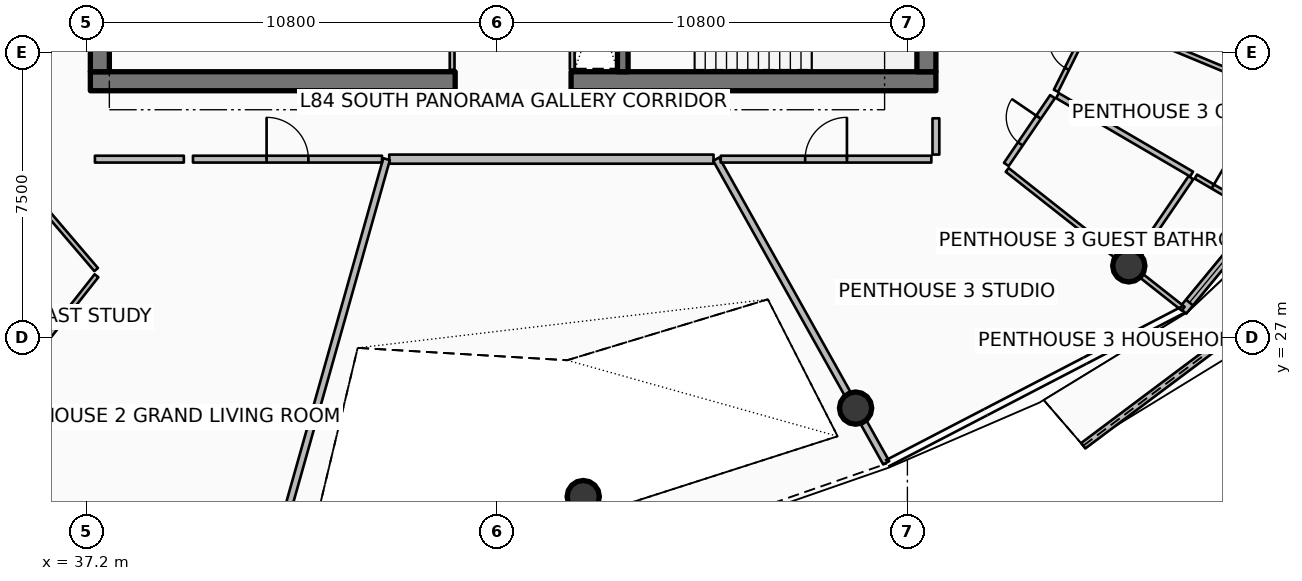
"""IFC4 building model, lengths in metres.
Left out: names, types, materials, properties, quantities, classifications, styles, units other than length and angle.
Written with IfcOpenShell. Run it as: python <this file> out.ifc"""

import sys

from ifc_helpers import new_model, si_unit, direction, frame, frame_2d, origin, origin_2d, place, context, subcontext, project, spatial, polyline, rectangle, circle, outline, extrude, element, fill, save


model = new_model("IFC4")
c1 = context("Model", 3, precision=1e-05, world=origin(), true_north=direction((0.0, 1.0)))
c2 = subcontext(c1, "Body", "Model", "MODEL_VIEW")
j1 = project(units=[si_unit("LENGTHUNIT", "METRE"), si_unit("PLANEANGLEUNIT", "RADIAN")], contexts=[c1])
p1 = place(None, origin())
s1 = spatial("IfcSite", under=j1, at=p1, CompositionType="ELEMENT")
p2 = place(p1, origin())
s2 = spatial("IfcBuilding", under=s1, at=p2, CompositionType="ELEMENT")
p3 = place(p2, frame((0.0, 0.0, 334.7)))
s3 = spatial("IfcBuildingStorey", under=s2, at=p3, CompositionType="ELEMENT", Elevation=334.7)
p4 = place(p3, frame((37.3, 33.75, 0.0), z_axis=(0.0, 0.0, 1.0), x_axis=(1.0, 0.0, 0.0)))
e1 = element("IfcWall", 1, at=p4, inside=s3, PredefinedType="SHEAR", context=c2, shape_type="SweptSolid", body=[
    extrude(rectangle(XDim=9.6, YDim=0.5, at=frame_2d((4.8, 0.0))), origin(), (0.0, 0.0, 1.0), 4.2),
])
p5 = place(p3, frame((49.95, 33.75, 0.0), z_axis=(0.0, 0.0, 1.0), x_axis=(1.0, 0.0, 0.0)))
e2 = element("IfcWall", 2, at=p5, inside=s3, PredefinedType="SHEAR", context=c2, shape_type="SweptSolid", body=[
    extrude(rectangle(XDim=9.6, YDim=0.5, at=frame_2d((4.8, 0.0))), origin(), (0.0, 0.0, 1.0), 4.2),
])
for number, where, z_axis, x_axis in (
    (3, (37.55, 34.0, 0.0), (0.0, 0.0, 1.0), (0.0, 1.0, 0.0)),
    (4, (59.3, 34.0, 0.0), (0.0, 0.0, 1.0), (0.0, 1.0, 0.0)),
):
    element("IfcWall", number, at=place(p3, frame(where, z_axis=z_axis, x_axis=x_axis)), inside=s3, PredefinedType="SHEAR", context=c2, shape_type="SweptSolid", body=[
        extrude(rectangle(XDim=16.0, YDim=0.5, at=frame_2d((8.0, 0.0))), origin(), (0.0, 0.0, 1.0), 4.2),
    ])
p6 = place(p3, frame((51.31, 34.0, 0.0), z_axis=(0.0, 0.0, 1.0), x_axis=(0.0, 1.0, 0.0)))
e5 = element("IfcWall", 5, at=p6, inside=s3, PredefinedType="SHEAR", context=c2, shape_type="SweptSolid", body=[
    extrude(rectangle(XDim=3.5, YDim=0.28, at=frame_2d((1.75, 0.0))), origin(), (0.0, 0.0, 1.0), 4.2),
])
p7 = place(p3, frame((50.27, 22.821, 0.0), z_axis=(0.0, 0.0, 1.0), x_axis=(1.0, 0.0, 0.0)))
e6 = element("IfcColumn", 6, at=p7, inside=s3, PredefinedType="COLUMN", context=c2, shape_type="SweptSolid", body=[
    extrude(circle(Radius=0.425, at=origin_2d()), origin(), (0.0, 0.0, 1.0), 4.196),
])
for number, where, z_axis, x_axis in (
    (7, (57.437, 25.149, 0.0), (0.0, 0.0, 1.0), (1.0, 0.0, 0.0)),
    (8, (64.626, 28.893, 0.0), (0.0, 0.0, 1.0), (1.0, 0.0, 0.0)),
):
    element("IfcColumn", number, at=place(p3, frame(where, z_axis=z_axis, x_axis=x_axis)), inside=s3, PredefinedType="COLUMN", context=c2, shape_type="SweptSolid", body=[
        extrude(circle(Radius=0.425, at=origin_2d()), origin(), (0.0, 0.0, 1.0), 3.94),
    ])
p8 = place(p3, frame((63.427, 24.159, 0.0), z_axis=(0.0, 0.0, 1.0), x_axis=(0.800350065213, 0.599532962491, 0.0)))
e9 = element("IfcWall", 9, at=p8, inside=s3, PredefinedType="PARAPET", context=c2, shape_type="SweptSolid", body=[
    extrude(outline(polyline([(0.0, 0.0), (9.788, 0.0), (9.788, 1.348), (4.894, 1.182), (0.0, 1.12), (0.0, 0.0)])), frame((0.0, 0.09, 0.0), z_axis=(0.0, -1.0, 0.0), x_axis=(1.0, 0.0, 0.0)), (0.0, 0.0, 1.0), 0.18),
])
p9 = place(p3, frame((66.045, 27.711, 0.0), z_axis=(0.0, 0.0, 1.0), x_axis=(0.636803612721, 0.771026042897, 0.0)))
e10 = element("IfcWall", 10, at=p9, inside=s3, PredefinedType="SOLIDWALL", context=c2, shape_type="SweptSolid", body=[
    extrude(rectangle(XDim=9.728, YDim=0.24, at=frame_2d((4.864, 0.0))), origin(), (0.0, 0.0, 1.0), 2.89),
])
p10 = place(p9, frame((7.508, 0.0, 0.0)))
e11 = element("IfcOpeningElement", 11, at=p10, cuts=e10, PredefinedType="OPENING", context=c2, shape_type="SweptSolid", body=[
    extrude(rectangle(XDim=1.45, YDim=2.15, at=frame_2d((0.725, 1.075))), frame((0.0, 0.13, 0.0), z_axis=(0.0, -1.0, 0.0), x_axis=(1.0, 0.0, 0.0)), (0.0, 0.0, 1.0), 0.26),
])
p11 = place(p9, frame((0.28, 0.0, 0.65)))
e12 = element("IfcOpeningElement", 12, at=p11, cuts=e10, PredefinedType="OPENING", context=c2, shape_type="SweptSolid", body=[
    extrude(rectangle(XDim=1.6, YDim=1.5, at=frame_2d((0.8, 0.75))), frame((0.0, 0.13, 0.0), z_axis=(0.0, -1.0, 0.0), x_axis=(1.0, 0.0, 0.0)), (0.0, 0.0, 1.0), 0.26),
])
p12 = place(p3, frame((46.82, 34.05, 0.0), z_axis=(0.0, 0.0, 1.0), x_axis=(0.0, 1.0, 0.0)))
e13 = element("IfcWall", 13, at=p12, inside=s3, PredefinedType="PARTITIONING", context=c2, shape_type="SweptSolid", body=[
    extrude(rectangle(XDim=2.03, YDim=0.125, at=frame_2d((1.015, 0.0))), origin(), (0.0, 0.0, 1.0), 3.38),
])
p13 = place(p3, frame((49.98, 34.06, 0.0), z_axis=(0.0, 0.0, 1.0), x_axis=(0.0, 1.0, 0.0)))
e14 = element("IfcWall", 14, at=p13, inside=s3, PredefinedType="PARTITIONING", context=c2, shape_type="SweptSolid", body=[
    extrude(rectangle(XDim=3.4, YDim=0.125, at=frame_2d((1.7, 0.0))), origin(), (0.0, 0.0, 1.0), 3.38),
])
p14 = place(p3, frame((45.165, 31.7, 0.0), z_axis=(0.0, 0.0, 1.0), x_axis=(1.0, 0.0, 0.0)))
e15 = element("IfcWall", 15, at=p14, inside=s3, PredefinedType="SOLIDWALL", context=c2, shape_type="SweptSolid", body=[
    extrude(rectangle(XDim=8.533, YDim=0.24, at=frame_2d((4.267, 0.0))), origin(), (0.0, 0.0, 1.0), 3.38),
])
p15 = place(p3, frame((45.095, 31.7, 0.0), z_axis=(0.0, 0.0, 1.0), x_axis=(-0.271453030279, -0.962451688321, 0.0)))
e16 = element("IfcWall", 16, at=p15, inside=s3, PredefinedType="PARTITIONING", context=c2, shape_type="SweptSolid", body=[
    extrude(rectangle(XDim=12.191, YDim=0.18, at=frame_2d((6.096, 0.0))), origin(), (0.0, 0.0, 1.0), 3.38),
])
p16 = place(p3, frame((53.768, 31.7, 0.0), z_axis=(0.0, 0.0, 1.0), x_axis=(0.488623665245, -0.872494649704, 0.0)))
e17 = element("IfcWall", 17, at=p16, inside=s3, PredefinedType="PARTITIONING", context=c2, shape_type="SweptSolid", body=[
    extrude(rectangle(XDim=9.157, YDim=0.18, at=frame_2d((4.579, 0.0))), origin(), (0.0, 0.0, 1.0), 3.38),
])
p17 = place(p3, frame((40.0, 31.7, 0.0), z_axis=(0.0, 0.0, 1.0), x_axis=(1.0, 0.0, 0.0)))
e18 = element("IfcWall", 18, at=p17, inside=s3, PredefinedType="PARTITIONING", context=c2, shape_type="SweptSolid", body=[
    extrude(rectangle(XDim=4.975, YDim=0.18, at=frame_2d((2.488, 0.0))), origin(), (0.0, 0.0, 1.0), 3.38),
])
p18 = place(p17, frame((1.938, 0.0, 0.0)))
e19 = element("IfcOpeningElement", 19, at=p18, cuts=e18, PredefinedType="OPENING", context=c2, shape_type="SweptSolid", body=[
    extrude(rectangle(XDim=1.1, YDim=2.1, at=frame_2d((0.55, 1.05))), frame((0.0, 0.1, 0.0), z_axis=(0.0, -1.0, 0.0), x_axis=(1.0, 0.0, 0.0)), (0.0, 0.0, 1.0), 0.2),
])
p19 = place(p3, frame((37.42, 31.7, 0.0), z_axis=(0.0, 0.0, 1.0), x_axis=(1.0, 0.0, 0.0)))
e20 = element("IfcWall", 20, at=p19, inside=s3, PredefinedType="PARTITIONING", context=c2, shape_type="SweptSolid", body=[
    extrude(rectangle(XDim=2.34, YDim=0.18, at=frame_2d((1.17, 0.0))), origin(), (0.0, 0.0, 1.0), 3.38),
])
p20 = place(p3, frame((37.462, 28.632, 0.0), z_axis=(0.0, 0.0, 1.0), x_axis=(-0.619099165969, -0.78531281837, 0.0)))
e21 = element("IfcWall", 21, at=p20, inside=s3, PredefinedType="PARTITIONING", context=c2, shape_type="SweptSolid", body=[
    extrude(rectangle(XDim=8.105, YDim=0.125, at=frame_2d((4.052, 0.0))), origin(), (0.0, 0.0, 1.0), 3.38),
])
p21 = place(p3, frame((33.307, 33.648, 0.0), z_axis=(0.0, 0.0, 1.0), x_axis=(0.649467421322, -0.760389419075, 0.0)))
e22 = element("IfcWall", 22, at=p21, inside=s3, PredefinedType="PARTITIONING", context=c2, shape_type="SweptSolid", body=[
    extrude(rectangle(XDim=6.383, YDim=0.125, at=frame_2d((3.191, 0.0))), origin(), (0.0, 0.0, 1.0), 3.38),
])
p22 = place(p21, frame((2.741, 0.0, 0.0)))
e23 = element("IfcOpeningElement", 23, at=p22, cuts=e22, PredefinedType="OPENING", context=c2, shape_type="SweptSolid", body=[
    extrude(rectangle(XDim=0.9, YDim=2.08, at=frame_2d((0.45, 1.04))), frame((0.0, 0.073, 0.0), z_axis=(0.0, -1.0, 0.0), x_axis=(1.0, 0.0, 0.0)), (0.0, 0.0, 1.0), 0.145),
])
p23 = place(p3, frame((53.888, 31.7, 0.0), z_axis=(0.0, 0.0, 1.0), x_axis=(1.0, 0.0, 0.0)))
e24 = element("IfcWall", 24, at=p23, inside=s3, PredefinedType="PARTITIONING", context=c2, shape_type="SweptSolid", body=[
    extrude(rectangle(XDim=5.542, YDim=0.18, at=frame_2d((2.771, 0.0))), origin(), (0.0, 0.0, 1.0), 3.38),
])
p24 = place(p23, frame((2.221, 0.0, 0.0)))
e25 = element("IfcOpeningElement", 25, at=p24, cuts=e24, PredefinedType="OPENING", context=c2, shape_type="SweptSolid", body=[
    extrude(rectangle(XDim=1.1, YDim=2.1, at=frame_2d((0.55, 1.05))), frame((0.0, 0.1, 0.0), z_axis=(0.0, -1.0, 0.0), x_axis=(1.0, 0.0, 0.0)), (0.0, 0.0, 1.0), 0.2),
])
p25 = place(p3, frame((59.55, 31.82, 0.0), z_axis=(0.0, 0.0, 1.0), x_axis=(0.0, 1.0, 0.0)))
e26 = element("IfcWall", 26, at=p25, inside=s3, PredefinedType="PARTITIONING", context=c2, shape_type="SweptSolid", body=[
    extrude(rectangle(XDim=0.955, YDim=0.18, at=frame_2d((0.477, 0.0))), origin(), (0.0, 0.0, 1.0), 3.38),
])
p26 = place(p3, frame((61.426, 31.416, 0.0), z_axis=(0.0, 0.0, 1.0), x_axis=(0.785316001521, -0.619095128196, 0.0)))
e27 = element("IfcWall", 27, at=p26, inside=s3, PredefinedType="PARTITIONING", context=c2, shape_type="SweptSolid", body=[
    extrude(rectangle(XDim=5.897, YDim=0.125, at=frame_2d((2.949, 0.0))), origin(), (0.0, 0.0, 1.0), 3.38),
])
p27 = place(p3, frame((61.404, 31.561, 0.0), z_axis=(0.0, 0.0, 1.0), x_axis=(0.563417581251, 0.826172275701, 0.0)))
e28 = element("IfcWall", 28, at=p27, inside=s3, PredefinedType="PARTITIONING", context=c2, shape_type="SweptSolid", body=[
    extrude(rectangle(XDim=2.157, YDim=0.15, at=frame_2d((1.079, 0.0))), origin(), (0.0, 0.0, 1.0), 3.38),
])
p28 = place(p27, frame((0.654, 0.0, 0.0)))
e29 = element("IfcOpeningElement", 29, at=p28, cuts=e28, PredefinedType="OPENING", context=c2, shape_type="SweptSolid", body=[
    extrude(rectangle(XDim=0.85, YDim=2.06, at=frame_2d((0.425, 1.03))), frame((0.0, 0.085, 0.0), z_axis=(0.0, -1.0, 0.0), x_axis=(1.0, 0.0, 0.0)), (0.0, 0.0, 1.0), 0.17),
])
p29 = place(p3, frame((64.718, 28.948, 0.0), z_axis=(0.0, 0.0, 1.0), x_axis=(0.563428051063, 0.826165135596, 0.0)))
e30 = element("IfcWall", 30, at=p29, inside=s3, PredefinedType="PARTITIONING", context=c2, shape_type="SweptSolid", body=[
    extrude(rectangle(XDim=2.74, YDim=0.15, at=frame_2d((1.37, 0.0))), origin(), (0.0, 0.0, 1.0), 3.38),
])
p30 = place(p3, frame((62.748, 33.372, 0.0), z_axis=(0.0, 0.0, 1.0), x_axis=(0.863113475275, -0.505010028413, 0.0)))
e31 = element("IfcWall", 31, at=p30, inside=s3, PredefinedType="PARTITIONING", context=c2, shape_type="SweptSolid", body=[
    extrude(rectangle(XDim=4.09, YDim=0.15, at=frame_2d((2.045, 0.0))), origin(), (0.0, 0.0, 1.0), 3.38),
])
p31 = place(p3, frame((66.39, 31.241, 0.0), z_axis=(0.0, 0.0, 1.0), x_axis=(0.863105475884, -0.505023699939, 0.0)))
e32 = element("IfcWall", 32, at=p31, inside=s3, PredefinedType="PARTITIONING", context=c2, shape_type="SweptSolid", body=[
    extrude(rectangle(XDim=1.883, YDim=0.125, at=frame_2d((0.941, 0.0))), origin(), (0.0, 0.0, 1.0), 3.38),
])
p32 = place(p31, frame((0.516, 0.0, 0.0)))
e33 = element("IfcOpeningElement", 33, at=p32, cuts=e32, PredefinedType="OPENING", context=c2, shape_type="SweptSolid", body=[
    extrude(rectangle(XDim=0.85, YDim=2.06, at=frame_2d((0.425, 1.03))), frame((0.0, 0.073, 0.0), z_axis=(0.0, -1.0, 0.0), x_axis=(1.0, 0.0, 0.0)), (0.0, 0.0, 1.0), 0.145),
])
p33 = place(p3, frame((63.782, 35.453, 0.0), z_axis=(0.0, 0.0, 1.0), x_axis=(0.923676337231, -0.383173621274, 0.0)))
e34 = element("IfcWall", 34, at=p33, inside=s3, PredefinedType="PARTITIONING", context=c2, shape_type="SweptSolid", body=[
    extrude(rectangle(XDim=6.856, YDim=0.125, at=frame_2d((3.428, 0.0))), origin(), (0.0, 0.0, 1.0), 3.38),
])
p34 = place(p3, frame((62.71, 33.498, 0.0), z_axis=(0.0, 0.0, 1.0), x_axis=(0.44506959559, 0.895495982728, 0.0)))
e35 = element("IfcWall", 35, at=p34, inside=s3, PredefinedType="PARTITIONING", context=c2, shape_type="SweptSolid", body=[
    extrude(rectangle(XDim=2.142, YDim=0.125, at=frame_2d((1.071, 0.0))), origin(), (0.0, 0.0, 1.0), 3.38),
])
p35 = place(p34, frame((0.646, 0.0, 0.0)))
e36 = element("IfcOpeningElement", 36, at=p35, cuts=e35, PredefinedType="OPENING", context=c2, shape_type="SweptSolid", body=[
    extrude(rectangle(XDim=0.85, YDim=2.06, at=frame_2d((0.425, 1.03))), frame((0.0, 0.073, 0.0), z_axis=(0.0, -1.0, 0.0), x_axis=(1.0, 0.0, 0.0)), (0.0, 0.0, 1.0), 0.145),
])
p36 = place(p11, origin())
e37 = element("IfcWindow", 37, at=p36, inside=s3, PartitioningType="SINGLE_PANEL", PredefinedType="WINDOW", context=c2, shape_type="SweptSolid", body=[
    extrude(rectangle(XDim=1.6, YDim=1.5, at=frame_2d((0.8, 0.75))), frame((0.0, 0.03, 0.0), z_axis=(0.0, -1.0, 0.0), x_axis=(1.0, 0.0, 0.0)), (0.0, 0.0, 1.0), 0.06),
])
fill(e12, e37)
p37 = place(p18, origin())
e38 = element("IfcDoor", 38, at=p37, inside=s3, OperationType="SINGLE_SWING_LEFT", PredefinedType="DOOR", context=c2, shape_type="SweptSolid", body=[
    extrude(rectangle(XDim=1.1, YDim=2.1, at=frame_2d((0.55, 1.05))), frame((0.0, 0.025, 0.0), z_axis=(0.0, -1.0, 0.0), x_axis=(1.0, 0.0, 0.0)), (0.0, 0.0, 1.0), 0.05),
])
fill(e19, e38)
p38 = place(p24, origin())
e39 = element("IfcDoor", 39, at=p38, inside=s3, OperationType="SINGLE_SWING_RIGHT", PredefinedType="DOOR", context=c2, shape_type="SweptSolid", body=[
    extrude(rectangle(XDim=1.1, YDim=2.1, at=frame_2d((0.55, 1.05))), frame((0.0, 0.025, 0.0), z_axis=(0.0, -1.0, 0.0), x_axis=(1.0, 0.0, 0.0)), (0.0, 0.0, 1.0), 0.05),
])
fill(e25, e39)
p39 = place(p28, origin())
e40 = element("IfcDoor", 40, at=p39, inside=s3, OperationType="SINGLE_SWING_RIGHT", PredefinedType="DOOR", context=c2, shape_type="SweptSolid", body=[
    extrude(rectangle(XDim=0.85, YDim=2.06, at=frame_2d((0.425, 1.03))), frame((0.0, 0.025, 0.0), z_axis=(0.0, -1.0, 0.0), x_axis=(1.0, 0.0, 0.0)), (0.0, 0.0, 1.0), 0.05),
])
fill(e29, e40)
p40 = place(p32, origin())
e41 = element("IfcDoor", 41, at=p40, inside=s3, OperationType="SINGLE_SWING_LEFT", PredefinedType="DOOR", context=c2, shape_type="SweptSolid", body=[
    extrude(rectangle(XDim=0.85, YDim=2.06, at=frame_2d((0.425, 1.03))), frame((0.0, 0.025, 0.0), z_axis=(0.0, -1.0, 0.0), x_axis=(1.0, 0.0, 0.0)), (0.0, 0.0, 1.0), 0.05),
])
fill(e33, e41)
p41 = place(p35, origin())
e42 = element("IfcDoor", 42, at=p41, inside=s3, OperationType="SINGLE_SWING_RIGHT", PredefinedType="DOOR", context=c2, shape_type="SweptSolid", body=[
    extrude(rectangle(XDim=0.85, YDim=2.06, at=frame_2d((0.425, 1.03))), frame((0.0, 0.025, 0.0), z_axis=(0.0, -1.0, 0.0), x_axis=(1.0, 0.0, 0.0)), (0.0, 0.0, 1.0), 0.05),
])
fill(e36, e42)
save(model, sys.argv[1])
